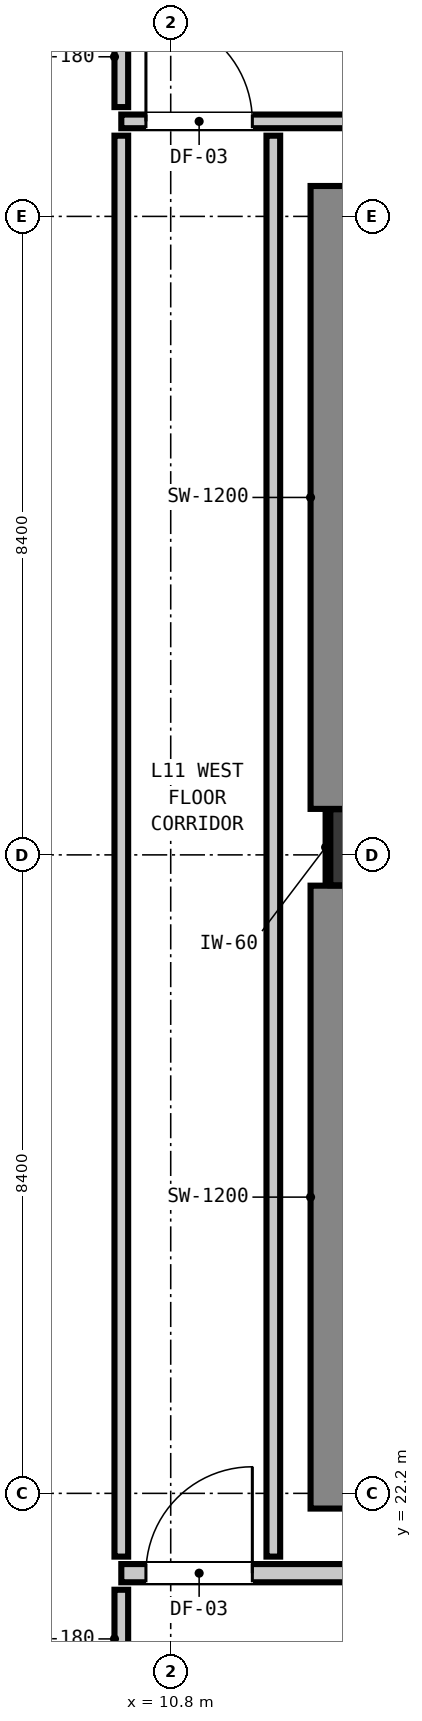
"""IFC4 building model, lengths in metres.
Left out: names, types, materials, properties, quantities, classifications, styles, units other than length and angle.
Written with IfcOpenShell. Run it as: python <this file> out.ifc"""

import sys

from ifc_helpers import new_model, si_unit, direction, frame, frame_2d, origin, origin_2d, place, context, subcontext, project, spatial, rectangle, extrude, element, fill, save


model = new_model("IFC4")
c1 = context("Model", 3, precision=1e-05, world=origin(), true_north=direction((0.0, 1.0)))
c2 = subcontext(c1, "Body", "Model", "MODEL_VIEW")
j1 = project(units=[si_unit("LENGTHUNIT", "METRE"), si_unit("PLANEANGLEUNIT", "RADIAN")], contexts=[c1])
p1 = place(None, origin())
s1 = spatial("IfcSite", under=j1, at=p1, CompositionType="ELEMENT")
p2 = place(p1, origin())
s2 = spatial("IfcBuilding", under=s1, at=p2, CompositionType="ELEMENT")
p3 = place(p2, frame((0.0, 0.0, 41.92)))
s3 = spatial("IfcBuildingStorey", under=s2, at=p3, CompositionType="ELEMENT", Elevation=41.92)
p4 = place(p3, frame((13.4, 30.7, 0.0), z_axis=(0.0, 0.0, 1.0), x_axis=(1.0, 0.0, 0.0)))
e1 = element("IfcColumn", 1, at=p4, inside=s3, PredefinedType="COLUMN", context=c2, shape_type="SweptSolid", body=[
    extrude(rectangle(XDim=1.0, YDim=1.0, at=origin_2d()), origin(), (0.0, 0.0, 1.0), 3.32),
])
p5 = place(p3, frame((13.24, 22.0, 0.0), z_axis=(0.0, 0.0, 1.0), x_axis=(0.0, 1.0, 0.0)))
e2 = element("IfcWall", 2, at=p5, inside=s3, PredefinedType="SHEAR", context=c2, shape_type="SweptSolid", body=[
    extrude(rectangle(XDim=8.195, YDim=1.2, at=frame_2d((4.098, 0.0))), origin(), (0.0, 0.0, 1.0), 3.32),
])
p6 = place(p3, frame((13.24, 31.205, 0.0), z_axis=(0.0, 0.0, 1.0), x_axis=(0.0, 1.0, 0.0)))
e3 = element("IfcWall", 3, at=p6, inside=s3, PredefinedType="SHEAR", context=c2, shape_type="SweptSolid", body=[
    extrude(rectangle(XDim=8.195, YDim=1.2, at=frame_2d((4.097, 0.0))), origin(), (0.0, 0.0, 1.0), 3.32),
])
p7 = place(p3, frame((10.15, 21.15, 0.0), z_axis=(0.0, 0.0, 1.0), x_axis=(1.0, 0.0, 0.0)))
e4 = element("IfcWall", 4, at=p7, inside=s3, PredefinedType="PARTITIONING", context=c2, shape_type="SweptSolid", body=[
    extrude(rectangle(XDim=40.023, YDim=0.24, at=frame_2d((20.012, 0.0))), origin(), (0.0, 0.0, 1.0), 3.06),
])
p8 = place(p7, frame((8.06, 0.0, 0.0)))
e5 = element("IfcOpeningElement", 5, at=p8, cuts=e4, PredefinedType="OPENING", context=c2, shape_type="SweptSolid", body=[
    extrude(rectangle(XDim=1.1, YDim=2.15, at=frame_2d((0.55, 1.075))), frame((0.0, 0.13, 0.0), z_axis=(0.0, -1.0, 0.0), x_axis=(1.0, 0.0, 0.0)), (0.0, 0.0, 1.0), 0.26),
])
p9 = place(p7, frame((0.324, 0.0, 0.0)))
e6 = element("IfcOpeningElement", 6, at=p9, cuts=e4, PredefinedType="OPENING", context=c2, shape_type="SweptSolid", body=[
    extrude(rectangle(XDim=1.4, YDim=2.15, at=frame_2d((0.7, 1.075))), frame((0.0, 0.13, 0.0), z_axis=(0.0, -1.0, 0.0), x_axis=(1.0, 0.0, 0.0)), (0.0, 0.0, 1.0), 0.26),
])
p10 = place(p7, frame((33.574, 0.0, 0.0)))
e7 = element("IfcOpeningElement", 7, at=p10, cuts=e4, PredefinedType="OPENING", context=c2, shape_type="SweptSolid", body=[
    extrude(rectangle(XDim=1.0, YDim=2.15, at=frame_2d((0.5, 1.075))), frame((0.0, 0.13, 0.0), z_axis=(0.0, -1.0, 0.0), x_axis=(1.0, 0.0, 0.0)), (0.0, 0.0, 1.0), 0.26),
])
p11 = place(p3, frame((10.15, 40.25, 0.0), z_axis=(0.0, 0.0, 1.0), x_axis=(1.0, 0.0, 0.0)))
e8 = element("IfcWall", 8, at=p11, inside=s3, PredefinedType="PARTITIONING", context=c2, shape_type="SweptSolid", body=[
    extrude(rectangle(XDim=26.782, YDim=0.18, at=frame_2d((13.391, 0.0))), origin(), (0.0, 0.0, 1.0), 3.06),
])
p12 = place(p11, frame((7.285, 0.0, 0.0)))
e9 = element("IfcOpeningElement", 9, at=p12, cuts=e8, PredefinedType="OPENING", context=c2, shape_type="SweptSolid", body=[
    extrude(rectangle(XDim=1.4, YDim=2.15, at=frame_2d((0.7, 1.075))), frame((0.0, 0.1, 0.0), z_axis=(0.0, -1.0, 0.0), x_axis=(1.0, 0.0, 0.0)), (0.0, 0.0, 1.0), 0.2),
])
p13 = place(p11, frame((0.324, 0.0, 0.0)))
e10 = element("IfcOpeningElement", 10, at=p13, cuts=e8, PredefinedType="OPENING", context=c2, shape_type="SweptSolid", body=[
    extrude(rectangle(XDim=1.4, YDim=2.15, at=frame_2d((0.7, 1.075))), frame((0.0, 0.1, 0.0), z_axis=(0.0, -1.0, 0.0), x_axis=(1.0, 0.0, 0.0)), (0.0, 0.0, 1.0), 0.2),
])
p14 = place(p3, frame((10.15, 19.638, 0.0), z_axis=(0.0, 0.0, 1.0), x_axis=(0.0, 1.0, 0.0)))
e11 = element("IfcWall", 11, at=p14, inside=s3, PredefinedType="PARTITIONING", context=c2, shape_type="SweptSolid", body=[
    extrude(rectangle(XDim=1.294, YDim=0.18, at=frame_2d((0.647, 0.0))), origin(), (0.0, 0.0, 1.0), 3.06),
])
p15 = place(p3, frame((10.15, 21.368, 0.0), z_axis=(0.0, 0.0, 1.0), x_axis=(0.0, 1.0, 0.0)))
e12 = element("IfcWall", 12, at=p15, inside=s3, PredefinedType="PARTITIONING", context=c2, shape_type="SweptSolid", body=[
    extrude(rectangle(XDim=18.694, YDim=0.18, at=frame_2d((9.347, 0.0))), origin(), (0.0, 0.0, 1.0), 3.06),
])
p16 = place(p3, frame((10.15, 40.438, 0.0), z_axis=(0.0, 0.0, 1.0), x_axis=(0.0, 1.0, 0.0)))
e13 = element("IfcWall", 13, at=p16, inside=s3, PredefinedType="PARTITIONING", context=c2, shape_type="SweptSolid", body=[
    extrude(rectangle(XDim=1.324, YDim=0.18, at=frame_2d((0.662, 0.0))), origin(), (0.0, 0.0, 1.0), 2.445),
])
p17 = place(p3, frame((12.15, 21.368, 0.0), z_axis=(0.0, 0.0, 1.0), x_axis=(0.0, 1.0, 0.0)))
e14 = element("IfcWall", 14, at=p17, inside=s3, PredefinedType="PARTITIONING", context=c2, shape_type="SweptSolid", body=[
    extrude(rectangle(XDim=18.694, YDim=0.18, at=frame_2d((9.347, 0.0))), origin(), (0.0, 0.0, 1.0), 3.06),
])
p18 = place(p3, frame((12.868, 30.21, 0.0), z_axis=(0.0, 0.0, 1.0), x_axis=(0.0, 1.0, 0.0)))
e15 = element("IfcWall", 15, at=p18, inside=s3, PredefinedType="PARTITIONING", context=c2, shape_type="SweptSolid", body=[
    extrude(rectangle(XDim=0.98, YDim=0.06, at=frame_2d((0.49, 0.0))), origin(), (0.0, 0.0, 1.0), 1.45),
])
p19 = place(p9, origin())
e16 = element("IfcDoor", 16, at=p19, inside=s3, OperationType="SINGLE_SWING_RIGHT", PredefinedType="DOOR", context=c2, shape_type="SweptSolid", body=[
    extrude(rectangle(XDim=1.4, YDim=2.15, at=frame_2d((0.7, 1.075))), frame((0.0, 0.025, 0.0), z_axis=(0.0, -1.0, 0.0), x_axis=(1.0, 0.0, 0.0)), (0.0, 0.0, 1.0), 0.05),
])
fill(e6, e16)
p20 = place(p13, origin())
e17 = element("IfcDoor", 17, at=p20, inside=s3, OperationType="SINGLE_SWING_LEFT", PredefinedType="DOOR", context=c2, shape_type="SweptSolid", body=[
    extrude(rectangle(XDim=1.4, YDim=2.15, at=frame_2d((0.7, 1.075))), frame((0.0, 0.025, 0.0), z_axis=(0.0, -1.0, 0.0), x_axis=(1.0, 0.0, 0.0)), (0.0, 0.0, 1.0), 0.05),
])
fill(e10, e17)
save(model, sys.argv[1])
